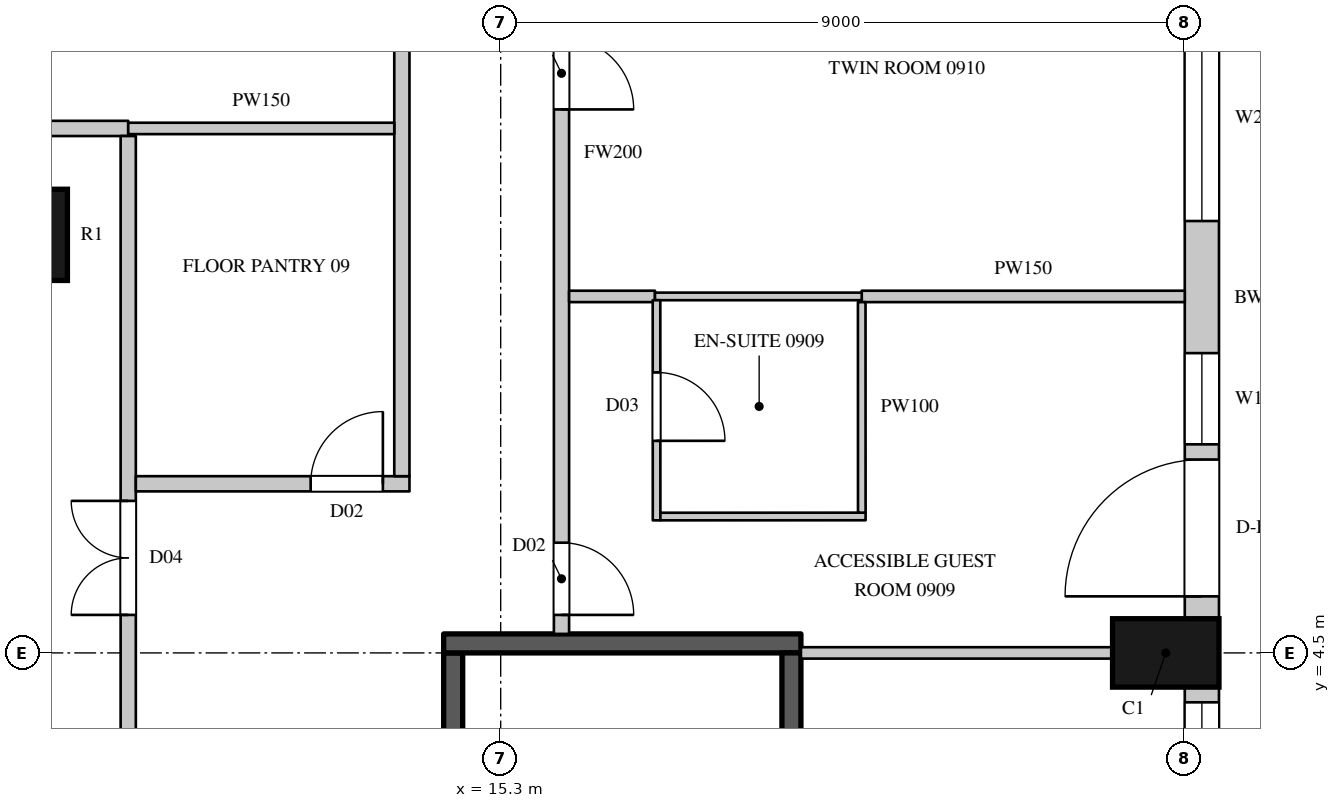
"""IFC4 building model, lengths in metres.
Left out: names, types, materials, properties, quantities, classifications, styles, units other than length and angle.
Written with IfcOpenShell. Run it as: python <this file> out.ifc"""

import sys

from ifc_helpers import new_model, si_unit, direction, frame, frame_2d, origin, origin_2d, place, context, subcontext, project, spatial, rectangle, circle, extrude, element, fill, save


model = new_model("IFC4")
c1 = context("Model", 3, precision=1e-05, world=origin(), true_north=direction((0.0, 1.0)))
c2 = subcontext(c1, "Body", "Model", "MODEL_VIEW")
j1 = project(units=[si_unit("LENGTHUNIT", "METRE"), si_unit("PLANEANGLEUNIT", "RADIAN")], contexts=[c1])
p1 = place(None, origin())
s1 = spatial("IfcSite", under=j1, at=p1, CompositionType="ELEMENT")
p2 = place(p1, origin())
s2 = spatial("IfcBuilding", under=s1, at=p2, CompositionType="ELEMENT")
p3 = place(p2, frame((0.0, 0.0, 62.7)))
s3 = spatial("IfcBuildingStorey", under=s2, at=p3, CompositionType="ELEMENT", Elevation=62.7)
p4 = place(p3, frame((24.05, 4.5, 0.0), z_axis=(0.0, 0.0, 1.0), x_axis=(0.0, 1.0, 0.0)))
e1 = element("IfcColumn", 1, at=p4, inside=s3, PredefinedType="COLUMN", context=c2, shape_type="SweptSolid", body=[
    extrude(rectangle(XDim=0.9, YDim=1.4, at=origin_2d()), origin(), (0.0, 0.0, 1.0), 3.6),
])
p5 = place(p3, frame((9.0, 10.0, 0.0), z_axis=(0.0, 0.0, 1.0), x_axis=(1.0, 0.0, 0.0)))
e2 = element("IfcColumn", 2, at=p5, inside=s3, PredefinedType="COLUMN", context=c2, shape_type="SweptSolid", body=[
    extrude(circle(Radius=0.6, at=origin_2d()), origin(), (0.0, 0.0, 1.0), 3.6),
])
p6 = place(p3, frame((24.525, -4.05, 0.0), z_axis=(0.0, 0.0, 1.0), x_axis=(0.0, 1.0, 0.0)))
e3 = element("IfcWall", 3, at=p6, inside=s3, PredefinedType="SOLIDWALL", context=c2, shape_type="SweptSolid", body=[
    extrude(rectangle(XDim=8.1, YDim=0.45, at=frame_2d((4.05, 0.0))), origin(), (0.0, 0.0, 1.0), 3.3),
])
p7 = place(p6, frame((0.2, 0.0, 0.0)))
e4 = element("IfcOpeningElement", 4, at=p7, cuts=e3, PredefinedType="OPENING", context=c2, shape_type="SweptSolid", body=[
    extrude(rectangle(XDim=1.8, YDim=2.4, at=frame_2d((0.9, 1.2))), frame((0.0, 0.235, 0.0), z_axis=(0.0, -1.0, 0.0), x_axis=(1.0, 0.0, 0.0)), (0.0, 0.0, 1.0), 0.47),
])
p8 = place(p6, frame((2.2, 0.0, 1.05)))
e5 = element("IfcOpeningElement", 5, at=p8, cuts=e3, PredefinedType="OPENING", context=c2, shape_type="SweptSolid", body=[
    extrude(rectangle(XDim=1.2, YDim=2.0, at=frame_2d((0.6, 1.0))), frame((0.0, 0.235, 0.0), z_axis=(0.0, -1.0, 0.0), x_axis=(1.0, 0.0, 0.0)), (0.0, 0.0, 1.0), 0.47),
])
p9 = place(p6, frame((4.7, 0.0, 0.0)))
e6 = element("IfcOpeningElement", 6, at=p9, cuts=e3, PredefinedType="OPENING", context=c2, shape_type="SweptSolid", body=[
    extrude(rectangle(XDim=1.8, YDim=2.4, at=frame_2d((0.9, 1.2))), frame((0.0, 0.235, 0.0), z_axis=(0.0, -1.0, 0.0), x_axis=(1.0, 0.0, 0.0)), (0.0, 0.0, 1.0), 0.47),
])
p10 = place(p6, frame((6.7, 0.0, 1.05)))
e7 = element("IfcOpeningElement", 7, at=p10, cuts=e3, PredefinedType="OPENING", context=c2, shape_type="SweptSolid", body=[
    extrude(rectangle(XDim=1.2, YDim=2.0, at=frame_2d((0.6, 1.0))), frame((0.0, 0.235, 0.0), z_axis=(0.0, -1.0, 0.0), x_axis=(1.0, 0.0, 0.0)), (0.0, 0.0, 1.0), 0.47),
])
p11 = place(p3, frame((24.525, 4.95, 0.0), z_axis=(0.0, 0.0, 1.0), x_axis=(0.0, 1.0, 0.0)))
e8 = element("IfcWall", 8, at=p11, inside=s3, PredefinedType="SOLIDWALL", context=c2, shape_type="SweptSolid", body=[
    extrude(rectangle(XDim=8.439, YDim=0.45, at=frame_2d((4.219, 0.0))), origin(), (0.0, 0.0, 1.0), 3.3),
])
p12 = place(p11, frame((0.294, 0.0, 0.0)))
e9 = element("IfcOpeningElement", 9, at=p12, cuts=e8, PredefinedType="OPENING", context=c2, shape_type="SweptSolid", body=[
    extrude(rectangle(XDim=1.8, YDim=2.4, at=frame_2d((0.9, 1.2))), frame((0.0, 0.235, 0.0), z_axis=(0.0, -1.0, 0.0), x_axis=(1.0, 0.0, 0.0)), (0.0, 0.0, 1.0), 0.47),
])
p13 = place(p11, frame((2.294, 0.0, 1.05)))
e10 = element("IfcOpeningElement", 10, at=p13, cuts=e8, PredefinedType="OPENING", context=c2, shape_type="SweptSolid", body=[
    extrude(rectangle(XDim=1.2, YDim=2.0, at=frame_2d((0.6, 1.0))), frame((0.0, 0.235, 0.0), z_axis=(0.0, -1.0, 0.0), x_axis=(1.0, 0.0, 0.0)), (0.0, 0.0, 1.0), 0.47),
])
p14 = place(p11, frame((5.232, 0.0, 1.05)))
e11 = element("IfcOpeningElement", 11, at=p14, cuts=e8, PredefinedType="OPENING", context=c2, shape_type="SweptSolid", body=[
    extrude(rectangle(XDim=2.7, YDim=2.0, at=frame_2d((1.35, 1.0))), frame((0.0, 0.235, 0.0), z_axis=(0.0, -1.0, 0.0), x_axis=(1.0, 0.0, 0.0)), (0.0, 0.0, 1.0), 0.47),
])
p15 = place(p3, frame((-8.3, 11.4, 0.0), z_axis=(0.0, 0.0, 1.0), x_axis=(1.0, 0.0, 0.0)))
e12 = element("IfcWall", 12, at=p15, inside=s3, PredefinedType="PARTITIONING", context=c2, shape_type="SweptSolid", body=[
    extrude(rectangle(XDim=18.7, YDim=0.2, at=frame_2d((9.35, 0.0))), origin(), (0.0, 0.0, 1.0), 3.3),
])
p16 = place(p15, frame((4.6, 0.0, 0.0)))
e13 = element("IfcOpeningElement", 13, at=p16, cuts=e12, PredefinedType="OPENING", context=c2, shape_type="SweptSolid", body=[
    extrude(rectangle(XDim=1.5, YDim=2.2, at=frame_2d((0.75, 1.1))), frame((0.0, 0.11, 0.0), z_axis=(0.0, -1.0, 0.0), x_axis=(1.0, 0.0, 0.0)), (0.0, 0.0, 1.0), 0.22),
])
p17 = place(p3, frame((10.4, -11.3, 0.0), z_axis=(0.0, 0.0, 1.0), x_axis=(0.0, 1.0, 0.0)))
e14 = element("IfcWall", 14, at=p17, inside=s3, PredefinedType="PARTITIONING", context=c2, shape_type="SweptSolid", body=[
    extrude(rectangle(XDim=22.6, YDim=0.2, at=frame_2d((11.3, 0.0))), origin(), (0.0, 0.0, 1.0), 3.3),
])
p18 = place(p17, frame((4.8, 0.0, 0.0)))
e15 = element("IfcOpeningElement", 15, at=p18, cuts=e14, PredefinedType="OPENING", context=c2, shape_type="SweptSolid", body=[
    extrude(rectangle(XDim=1.5, YDim=2.2, at=frame_2d((0.75, 1.1))), frame((0.0, 0.11, 0.0), z_axis=(0.0, -1.0, 0.0), x_axis=(1.0, 0.0, 0.0)), (0.0, 0.0, 1.0), 0.22),
])
p19 = place(p17, frame((16.3, 0.0, 0.0)))
e16 = element("IfcOpeningElement", 16, at=p19, cuts=e14, PredefinedType="OPENING", context=c2, shape_type="SweptSolid", body=[
    extrude(rectangle(XDim=1.5, YDim=2.2, at=frame_2d((0.75, 1.1))), frame((0.0, 0.11, 0.0), z_axis=(0.0, -1.0, 0.0), x_axis=(1.0, 0.0, 0.0)), (0.0, 0.0, 1.0), 0.22),
])
p20 = place(p17, frame((11.95, 0.0, 0.0)))
e17 = element("IfcOpeningElement", 17, at=p20, cuts=e14, PredefinedType="OPENING", context=c2, shape_type="SweptSolid", body=[
    extrude(rectangle(XDim=1.5, YDim=2.2, at=frame_2d((0.75, 1.1))), frame((0.0, 0.11, 0.0), z_axis=(0.0, -1.0, 0.0), x_axis=(1.0, 0.0, 0.0)), (0.0, 0.0, 1.0), 0.22),
])
p21 = place(p3, frame((10.5, 6.725, 0.0), z_axis=(0.0, 0.0, 1.0), x_axis=(1.0, 0.0, 0.0)))
e18 = element("IfcWall", 18, at=p21, inside=s3, PredefinedType="PARTITIONING", context=c2, shape_type="SweptSolid", body=[
    extrude(rectangle(XDim=3.6, YDim=0.2, at=frame_2d((1.8, 0.0))), origin(), (0.0, 0.0, 1.0), 3.3),
])
p22 = place(p21, frame((2.3, 0.0, 0.0)))
e19 = element("IfcOpeningElement", 19, at=p22, cuts=e18, PredefinedType="OPENING", context=c2, shape_type="SweptSolid", body=[
    extrude(rectangle(XDim=0.95, YDim=2.2, at=frame_2d((0.475, 1.1))), frame((0.0, 0.11, 0.0), z_axis=(0.0, -1.0, 0.0), x_axis=(1.0, 0.0, 0.0)), (0.0, 0.0, 1.0), 0.22),
])
p23 = place(p3, frame((14.0, 6.825, 0.0), z_axis=(0.0, 0.0, 1.0), x_axis=(0.0, 1.0, 0.0)))
e20 = element("IfcWall", 20, at=p23, inside=s3, PredefinedType="PARTITIONING", context=c2, shape_type="SweptSolid", body=[
    extrude(rectangle(XDim=8.475, YDim=0.2, at=frame_2d((4.238, 0.0))), origin(), (0.0, 0.0, 1.0), 3.3),
])
p24 = place(p3, frame((16.1, 4.75, 0.0), z_axis=(0.0, 0.0, 1.0), x_axis=(0.0, 1.0, 0.0)))
e21 = element("IfcWall", 21, at=p24, inside=s3, PredefinedType="PARTITIONING", context=c2, shape_type="SweptSolid", body=[
    extrude(rectangle(XDim=12.65, YDim=0.2, at=frame_2d((6.325, 0.0))), origin(), (0.0, 0.0, 1.0), 3.3),
])
p25 = place(p24, frame((0.25, 0.0, 0.0)))
e22 = element("IfcOpeningElement", 22, at=p25, cuts=e21, PredefinedType="OPENING", context=c2, shape_type="SweptSolid", body=[
    extrude(rectangle(XDim=0.95, YDim=2.2, at=frame_2d((0.475, 1.1))), frame((0.0, 0.11, 0.0), z_axis=(0.0, -1.0, 0.0), x_axis=(1.0, 0.0, 0.0)), (0.0, 0.0, 1.0), 0.22),
])
p26 = place(p24, frame((6.9, 0.0, 0.0)))
e23 = element("IfcOpeningElement", 23, at=p26, cuts=e21, PredefinedType="OPENING", context=c2, shape_type="SweptSolid", body=[
    extrude(rectangle(XDim=0.95, YDim=2.2, at=frame_2d((0.475, 1.1))), frame((0.0, 0.11, 0.0), z_axis=(0.0, -1.0, 0.0), x_axis=(1.0, 0.0, 0.0)), (0.0, 0.0, 1.0), 0.22),
])
p27 = place(p3, frame((10.4, 11.4, 0.0), z_axis=(0.0, 0.0, 1.0), x_axis=(1.0, 0.0, 0.0)))
e24 = element("IfcWall", 24, at=p27, inside=s3, PredefinedType="PARTITIONING", context=c2, shape_type="SweptSolid", body=[
    extrude(rectangle(XDim=3.5, YDim=0.15, at=frame_2d((1.75, 0.0))), origin(), (0.0, 0.0, 1.0), 3.3),
])
p28 = place(p3, frame((16.2, 9.19, 0.0), z_axis=(0.0, 0.0, 1.0), x_axis=(1.0, 0.0, 0.0)))
e25 = element("IfcWall", 25, at=p28, inside=s3, PredefinedType="PARTITIONING", context=c2, shape_type="SweptSolid", body=[
    extrude(rectangle(XDim=1.13, YDim=0.15, at=frame_2d((0.565, 0.0))), origin(), (0.0, 0.0, 1.0), 2.65),
])
p29 = place(p3, frame((19.25, 4.5, 0.0), z_axis=(0.0, 0.0, 1.0), x_axis=(1.0, 0.0, 0.0)))
e26 = element("IfcWall", 26, at=p29, inside=s3, PredefinedType="PARTITIONING", context=c2, shape_type="SweptSolid", body=[
    extrude(rectangle(XDim=4.1, YDim=0.15, at=frame_2d((2.05, 0.0))), origin(), (0.0, 0.0, 1.0), 3.3),
])
p30 = place(p3, frame((20.05, 9.19, 0.0), z_axis=(0.0, 0.0, 1.0), x_axis=(1.0, 0.0, 0.0)))
e27 = element("IfcWall", 27, at=p30, inside=s3, PredefinedType="PARTITIONING", context=c2, shape_type="SweptSolid", body=[
    extrude(rectangle(XDim=4.25, YDim=0.15, at=frame_2d((2.125, 0.0))), origin(), (0.0, 0.0, 1.0), 2.65),
])
p31 = place(p3, frame((14.675, -4.5, 0.0), z_axis=(0.0, 0.0, 1.0), x_axis=(0.0, 1.0, 0.0)))
e28 = element("IfcWall", 28, at=p31, inside=s3, PredefinedType="SHEAR", context=c2, shape_type="SweptSolid", body=[
    extrude(rectangle(XDim=9.0, YDim=0.25, at=frame_2d((4.5, 0.0))), origin(), (0.0, 0.0, 1.0), 3.3),
])
p32 = place(p31, frame((0.45, 0.0, 0.0)))
e29 = element("IfcOpeningElement", 29, at=p32, cuts=e28, PredefinedType="OPENING", context=c2, shape_type="SweptSolid", body=[
    extrude(rectangle(XDim=1.1, YDim=2.2, at=frame_2d((0.55, 1.1))), frame((0.0, 0.135, 0.0), z_axis=(0.0, -1.0, 0.0), x_axis=(1.0, 0.0, 0.0)), (0.0, 0.0, 1.0), 0.27),
])
p33 = place(p3, frame((14.55, 4.625, 0.0), z_axis=(0.0, 0.0, 1.0), x_axis=(1.0, 0.0, 0.0)))
e30 = element("IfcWall", 30, at=p33, inside=s3, PredefinedType="SHEAR", context=c2, shape_type="SweptSolid", body=[
    extrude(rectangle(XDim=4.7, YDim=0.25, at=frame_2d((2.35, 0.0))), origin(), (0.0, 0.0, 1.0), 3.3),
])
p34 = place(p3, frame((19.125, -4.5, 0.0), z_axis=(0.0, 0.0, 1.0), x_axis=(0.0, 1.0, 0.0)))
e31 = element("IfcWall", 31, at=p34, inside=s3, PredefinedType="SHEAR", context=c2, shape_type="SweptSolid", body=[
    extrude(rectangle(XDim=9.0, YDim=0.25, at=frame_2d((4.5, 0.0))), origin(), (0.0, 0.0, 1.0), 3.3),
])
p35 = place(p3, frame((17.33, 9.19, 0.0), z_axis=(0.0, 0.0, 1.0), x_axis=(1.0, 0.0, 0.0)))
e32 = element("IfcWall", 32, at=p35, inside=s3, PredefinedType="PARTITIONING", context=c2, shape_type="SweptSolid", body=[
    extrude(rectangle(XDim=2.72, YDim=0.1, at=frame_2d((1.36, 0.0))), origin(), (0.0, 0.0, 1.0), 2.65),
])
p36 = place(p3, frame((17.35, 9.14, 0.0), z_axis=(0.0, 0.0, 1.0), x_axis=(0.000337211244, -0.999999943144, 0.0)))
e33 = element("IfcWall", 33, at=p36, inside=s3, PredefinedType="PARTITIONING", context=c2, shape_type="SweptSolid", body=[
    extrude(rectangle(XDim=2.896, YDim=0.1, at=frame_2d((1.448, 0.0))), origin(), (0.0, 0.0, 1.0), 3.3),
])
p37 = place(p36, frame((0.95, 0.0, 0.0)))
e34 = element("IfcOpeningElement", 34, at=p37, cuts=e33, PredefinedType="OPENING", context=c2, shape_type="SweptSolid", body=[
    extrude(rectangle(XDim=0.9, YDim=2.2, at=frame_2d((0.45, 1.1))), frame((0.0, 0.06, 0.0), z_axis=(0.0, -1.0, 0.0), x_axis=(1.0, 0.0, 0.0)), (0.0, 0.0, 1.0), 0.12),
])
p38 = place(p3, frame((17.401, 6.294, 0.0), z_axis=(0.0, 0.0, 1.0), x_axis=(0.9999999346, 0.000361663629, 0.0)))
e35 = element("IfcWall", 35, at=p38, inside=s3, PredefinedType="PARTITIONING", context=c2, shape_type="SweptSolid", body=[
    extrude(rectangle(XDim=2.7, YDim=0.1, at=frame_2d((1.35, 0.0))), origin(), (0.0, 0.0, 1.0), 3.3),
])
p39 = place(p3, frame((20.05, 9.115, 0.0), z_axis=(0.0, 0.0, 1.0), x_axis=(0.000352547131, -0.999999937855, 0.0)))
e36 = element("IfcWall", 36, at=p39, inside=s3, PredefinedType="PARTITIONING", context=c2, shape_type="SweptSolid", body=[
    extrude(rectangle(XDim=2.77, YDim=0.1, at=frame_2d((1.385, 0.0))), origin(), (0.0, 0.0, 1.0), 3.3),
])
p40 = place(p10, origin())
e37 = element("IfcWindow", 37, at=p40, inside=s3, PartitioningType="SINGLE_PANEL", PredefinedType="WINDOW", context=c2, shape_type="SweptSolid", body=[
    extrude(rectangle(XDim=1.2, YDim=2.0, at=frame_2d((0.6, 1.0))), frame((0.0, 0.135, 0.0), z_axis=(0.0, -1.0, 0.0), x_axis=(1.0, 0.0, 0.0)), (0.0, 0.0, 1.0), 0.06),
])
fill(e7, e37)
p41 = place(p12, origin())
e38 = element("IfcDoor", 38, at=p41, inside=s3, OperationType="SLIDING_TO_LEFT", PredefinedType="DOOR", context=c2, shape_type="SweptSolid", body=[
    extrude(rectangle(XDim=1.8, YDim=2.4, at=frame_2d((0.9, 1.2))), frame((0.0, 0.13, 0.0), z_axis=(0.0, -1.0, 0.0), x_axis=(1.0, 0.0, 0.0)), (0.0, 0.0, 1.0), 0.05),
])
fill(e9, e38)
p42 = place(p13, origin())
e39 = element("IfcWindow", 39, at=p42, inside=s3, PartitioningType="SINGLE_PANEL", PredefinedType="WINDOW", context=c2, shape_type="SweptSolid", body=[
    extrude(rectangle(XDim=1.2, YDim=2.0, at=frame_2d((0.6, 1.0))), frame((0.0, 0.135, 0.0), z_axis=(0.0, -1.0, 0.0), x_axis=(1.0, 0.0, 0.0)), (0.0, 0.0, 1.0), 0.06),
])
fill(e10, e39)
p43 = place(p14, origin())
e40 = element("IfcWindow", 40, at=p43, inside=s3, PartitioningType="SINGLE_PANEL", PredefinedType="WINDOW", context=c2, shape_type="SweptSolid", body=[
    extrude(rectangle(XDim=2.7, YDim=2.0, at=frame_2d((1.35, 1.0))), frame((0.0, 0.135, 0.0), z_axis=(0.0, -1.0, 0.0), x_axis=(1.0, 0.0, 0.0)), (0.0, 0.0, 1.0), 0.06),
])
fill(e11, e40)
p44 = place(p19, origin())
e41 = element("IfcDoor", 41, at=p44, inside=s3, OperationType="DOUBLE_DOOR_SINGLE_SWING", PredefinedType="DOOR", context=c2, shape_type="SweptSolid", body=[
    extrude(rectangle(XDim=1.5, YDim=2.2, at=frame_2d((0.75, 1.1))), frame((0.0, 0.025, 0.0), z_axis=(0.0, -1.0, 0.0), x_axis=(1.0, 0.0, 0.0)), (0.0, 0.0, 1.0), 0.05),
])
fill(e16, e41)
p45 = place(p22, origin())
e42 = element("IfcDoor", 42, at=p45, inside=s3, OperationType="SINGLE_SWING_RIGHT", PredefinedType="DOOR", context=c2, shape_type="SweptSolid", body=[
    extrude(rectangle(XDim=0.95, YDim=2.2, at=frame_2d((0.475, 1.1))), frame((0.0, 0.025, 0.0), z_axis=(0.0, -1.0, 0.0), x_axis=(1.0, 0.0, 0.0)), (0.0, 0.0, 1.0), 0.05),
])
fill(e19, e42)
p46 = place(p25, origin())
e43 = element("IfcDoor", 43, at=p46, inside=s3, OperationType="SINGLE_SWING_RIGHT", PredefinedType="DOOR", context=c2, shape_type="SweptSolid", body=[
    extrude(rectangle(XDim=0.95, YDim=2.2, at=frame_2d((0.475, 1.1))), frame((0.0, 0.025, 0.0), z_axis=(0.0, -1.0, 0.0), x_axis=(1.0, 0.0, 0.0)), (0.0, 0.0, 1.0), 0.05),
])
fill(e22, e43)
p47 = place(p37, origin())
e44 = element("IfcDoor", 44, at=p47, inside=s3, OperationType="SINGLE_SWING_RIGHT", PredefinedType="DOOR", context=c2, shape_type="SweptSolid", body=[
    extrude(rectangle(XDim=0.9, YDim=2.2, at=frame_2d((0.45, 1.1))), frame((0.0, 0.025, 0.0), z_axis=(0.0, -1.0, 0.0), x_axis=(1.0, 0.0, 0.0)), (0.0, 0.0, 1.0), 0.05),
])
fill(e34, e44)
p48 = place(p26, origin())
e45 = element("IfcDoor", 45, at=p48, inside=s3, OperationType="SINGLE_SWING_RIGHT", PredefinedType="DOOR", context=c2, shape_type="SweptSolid", body=[
    extrude(rectangle(XDim=0.95, YDim=2.2, at=frame_2d((0.475, 1.1))), frame((0.0, 0.025, 0.0), z_axis=(0.0, -1.0, 0.0), x_axis=(1.0, 0.0, 0.0)), (0.0, 0.0, 1.0), 0.05),
])
fill(e23, e45)
save(model, sys.argv[1])
